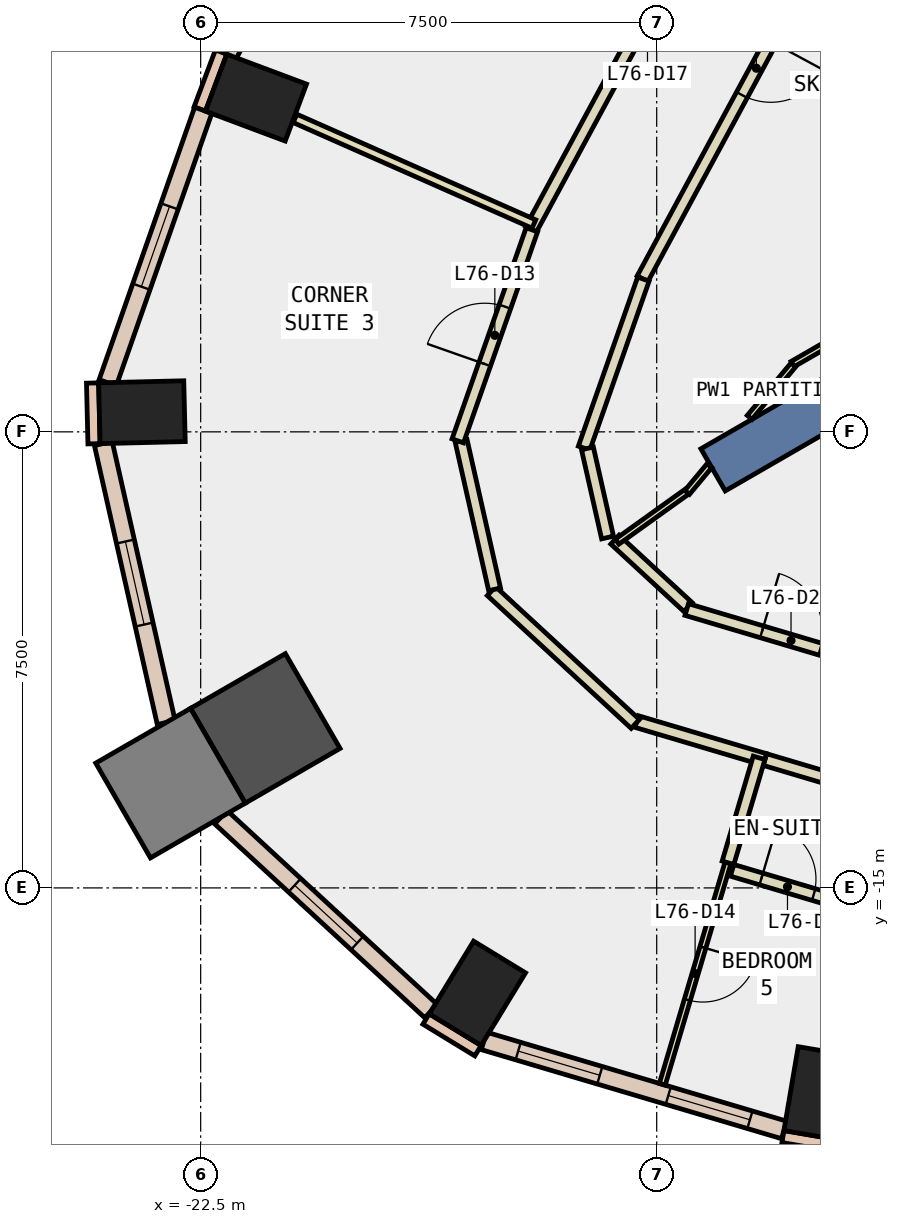
"""IFC4 building model, lengths in metres.
Left out: names, types, materials, properties, quantities, classifications, styles, units other than length and angle.
Written with IfcOpenShell. Run it as: python <this file> out.ifc"""

import sys

from ifc_helpers import new_model, si_unit, direction, frame, frame_2d, origin, origin_2d, place, context, subcontext, project, spatial, rectangle, extrude, element, fill, save


model = new_model("IFC4")
c1 = context("Model", 3, precision=1e-05, world=origin(), true_north=direction((0.0, 1.0)))
c2 = subcontext(c1, "Body", "Model", "MODEL_VIEW")
j1 = project(units=[si_unit("LENGTHUNIT", "METRE"), si_unit("PLANEANGLEUNIT", "RADIAN")], contexts=[c1])
p1 = place(None, origin())
s1 = spatial("IfcSite", under=j1, at=p1, CompositionType="ELEMENT")
p2 = place(p1, origin())
s2 = spatial("IfcBuilding", under=s1, at=p2, CompositionType="ELEMENT")
p3 = place(p2, frame((0.0, 0.0, 322.4)))
s3 = spatial("IfcBuildingStorey", under=s2, at=p3, CompositionType="ELEMENT", Elevation=322.4)
for number, where, z_axis, x_axis in (
    (1, (-12.297, -18.385, -0.34), (0.0, 0.0, 1.0), (-0.986, 0.168, 0.0)),
    (2, (-21.59, -2.004, -0.34), (0.0, 0.0, 1.0), (0.351, 0.936, 0.0)),
    (3, (-23.466, -7.177, -0.34), (0.0, 0.0, 1.0), (-0.024, 1.0, 0.0)),
):
    element("IfcColumn", number, at=place(p3, frame(where, z_axis=z_axis, x_axis=x_axis)), inside=s3, PredefinedType="COLUMN", context=c2, shape_type="SweptSolid", body=[
        extrude(rectangle(XDim=1.0, YDim=1.4, at=origin_2d()), origin(), (0.0, 0.0, 1.0), 3.34),
    ])
p4 = place(p3, frame((-21.437, -12.377, -0.34), z_axis=(0.0, 0.0, 1.0), x_axis=(0.866025403784, 0.5, 0.0)))
e4 = element("IfcColumn", 4, at=p4, inside=s3, PredefinedType="COLUMN", context=c2, shape_type="SweptSolid", body=[
    extrude(rectangle(XDim=1.8, YDim=1.8, at=origin_2d()), origin(), (0.0, 0.0, 1.0), 3.34),
])
p5 = place(p3, frame((-17.949, -16.734, -0.34), z_axis=(0.0, 0.0, 1.0), x_axis=(-0.853650808213, 0.520845752251, 0.0)))
e5 = element("IfcColumn", 5, at=p5, inside=s3, PredefinedType="COLUMN", context=c2, shape_type="SweptSolid", body=[
    extrude(rectangle(XDim=1.0, YDim=1.4, at=origin_2d()), origin(), (0.0, 0.0, 1.0), 3.34),
])
p6 = place(p3, frame((-22.996, -13.277, -0.34), z_axis=(0.0, 0.0, 1.0), x_axis=(0.866025403784, 0.5, 0.0)))
e6 = element("IfcColumn", 6, at=p6, inside=s3, PredefinedType="COLUMN", context=c2, shape_type="SweptSolid", body=[
    extrude(rectangle(XDim=1.8, YDim=1.8, at=origin_2d()), origin(), (0.0, 0.0, 1.0), 3.34),
])
p7 = place(p3, frame((-6.279, -3.625, -0.34), z_axis=(0.0, 0.0, 1.0), x_axis=(-0.866017533419, -0.500013631625, 0.0)))
e7 = element("IfcWall", 7, at=p7, inside=s3, PredefinedType="SHEAR", context=c2, shape_type="SweptSolid", body=[
    extrude(rectangle(XDim=9.0, YDim=0.8, at=frame_2d((4.5, 0.0))), origin(), (0.0, 0.0, 1.0), 3.34),
])
p8 = place(p3, frame((-22.164, -1.255, 0.0), z_axis=(0.0, 0.0, 1.0), x_axis=(-0.350962844851, -0.936389385637, 0.0)))
e8 = element("IfcWall", 8, at=p8, inside=s3, PredefinedType="STANDARD", context=c2, shape_type="SweptSolid", body=[
    extrude(rectangle(XDim=1.0, YDim=0.2, at=frame_2d((0.5, 0.0))), origin(), (0.0, 0.0, 1.0), 3.0),
])
p9 = place(p3, frame((-12.924, -19.089, 0.0), z_axis=(0.0, 0.0, 1.0), x_axis=(0.985800545746, -0.167920469293, 0.0)))
e9 = element("IfcWall", 9, at=p9, inside=s3, PredefinedType="STANDARD", context=c2, shape_type="SweptSolid", body=[
    extrude(rectangle(XDim=1.0, YDim=0.2, at=frame_2d((0.5, 0.0))), origin(), (0.0, 0.0, 1.0), 3.0),
])
p10 = place(p3, frame((-24.278, -6.697, 0.0), z_axis=(0.0, 0.0, 1.0), x_axis=(0.024186470916, -0.999707464524, 0.0)))
e10 = element("IfcWall", 10, at=p10, inside=s3, PredefinedType="STANDARD", context=c2, shape_type="SweptSolid", body=[
    extrude(rectangle(XDim=0.999, YDim=0.2, at=frame_2d((0.5, 0.0))), origin(), (0.0, 0.0, 1.0), 3.0),
])
p11 = place(p3, frame((-18.793, -17.156, 0.0), z_axis=(0.0, 0.0, 1.0), x_axis=(0.853679739553, -0.520798331677, 0.0)))
e11 = element("IfcWall", 11, at=p11, inside=s3, PredefinedType="STANDARD", context=c2, shape_type="SweptSolid", body=[
    extrude(rectangle(XDim=1.0, YDim=0.2, at=frame_2d((0.5, 0.0))), origin(), (0.0, 0.0, 1.0), 3.0),
])
p12 = place(p3, frame((-18.492, 5.285, 0.0), z_axis=(0.0, 0.0, 1.0), x_axis=(-0.475690331633, -0.879612817319, 0.0)))
e12 = element("IfcWall", 12, at=p12, inside=s3, PredefinedType="STANDARD", context=c2, shape_type="SweptSolid", body=[
    extrude(rectangle(XDim=7.484, YDim=0.3, at=frame_2d((3.742, 0.0))), origin(), (0.0, 0.0, 1.0), 3.0),
])
p13 = place(p12, frame((0.771, 0.0, 0.9)))
e13 = element("IfcOpeningElement", 13, at=p13, cuts=e12, PredefinedType="OPENING", context=c2, shape_type="SweptSolid", body=[
    extrude(rectangle(XDim=2.2, YDim=2.0, at=frame_2d((1.1, 1.0))), frame((0.0, 0.16, 0.0), z_axis=(0.0, -1.0, 0.0), x_axis=(1.0, 0.0, 0.0)), (0.0, 0.0, 1.0), 0.32),
])
p14 = place(p12, frame((4.513, 0.0, 0.9)))
e14 = element("IfcOpeningElement", 14, at=p14, cuts=e12, PredefinedType="OPENING", context=c2, shape_type="SweptSolid", body=[
    extrude(rectangle(XDim=2.2, YDim=2.0, at=frame_2d((1.1, 1.0))), frame((0.0, 0.16, 0.0), z_axis=(0.0, -1.0, 0.0), x_axis=(1.0, 0.0, 0.0)), (0.0, 0.0, 1.0), 0.32),
])
p15 = place(p3, frame((-22.458, -2.212, 0.0), z_axis=(0.0, 0.0, 1.0), x_axis=(-0.330923030855, -0.943657749213, 0.0)))
e15 = element("IfcWall", 15, at=p15, inside=s3, PredefinedType="STANDARD", context=c2, shape_type="SweptSolid", body=[
    extrude(rectangle(XDim=4.748, YDim=0.3, at=frame_2d((2.374, 0.0))), origin(), (0.0, 0.0, 1.0), 3.0),
])
p16 = place(p15, frame((1.674, 0.0, 0.9)))
e16 = element("IfcOpeningElement", 16, at=p16, cuts=e15, PredefinedType="OPENING", context=c2, shape_type="SweptSolid", body=[
    extrude(rectangle(XDim=1.4, YDim=2.0, at=frame_2d((0.7, 1.0))), frame((0.0, 0.16, 0.0), z_axis=(0.0, -1.0, 0.0), x_axis=(1.0, 0.0, 0.0)), (0.0, 0.0, 1.0), 0.32),
])
p17 = place(p3, frame((-24.101, -7.692, 0.0), z_axis=(0.0, 0.0, 1.0), x_axis=(0.219886442412, -0.975525475036, 0.0)))
e17 = element("IfcWall", 17, at=p17, inside=s3, PredefinedType="STANDARD", context=c2, shape_type="SweptSolid", body=[
    extrude(rectangle(XDim=4.703, YDim=0.3, at=frame_2d((2.352, 0.0))), origin(), (0.0, 0.0, 1.0), 3.0),
])
p18 = place(p17, frame((1.652, 0.0, 0.9)))
e18 = element("IfcOpeningElement", 18, at=p18, cuts=e17, PredefinedType="OPENING", context=c2, shape_type="SweptSolid", body=[
    extrude(rectangle(XDim=1.4, YDim=2.0, at=frame_2d((0.7, 1.0))), frame((0.0, 0.16, 0.0), z_axis=(0.0, -1.0, 0.0), x_axis=(1.0, 0.0, 0.0)), (0.0, 0.0, 1.0), 0.32),
])
p19 = place(p3, frame((-22.168, -13.837, 0.0), z_axis=(0.0, 0.0, 1.0), x_axis=(0.734934798699, -0.678137774838, 0.0)))
e19 = element("IfcWall", 19, at=p19, inside=s3, PredefinedType="STANDARD", context=c2, shape_type="SweptSolid", body=[
    extrude(rectangle(XDim=4.703, YDim=0.3, at=frame_2d((2.351, 0.0))), origin(), (0.0, 0.0, 1.0), 3.0),
])
p20 = place(p19, frame((1.651, 0.0, 0.9)))
e20 = element("IfcOpeningElement", 20, at=p20, cuts=e19, PredefinedType="OPENING", context=c2, shape_type="SweptSolid", body=[
    extrude(rectangle(XDim=1.4, YDim=2.0, at=frame_2d((0.7, 1.0))), frame((0.0, 0.16, 0.0), z_axis=(0.0, -1.0, 0.0), x_axis=(1.0, 0.0, 0.0)), (0.0, 0.0, 1.0), 0.32),
])
p21 = place(p3, frame((-17.842, -17.516, 0.0), z_axis=(0.0, 0.0, 1.0), x_axis=(0.958757933751, -0.284223898486, 0.0)))
e21 = element("IfcWall", 21, at=p21, inside=s3, PredefinedType="STANDARD", context=c2, shape_type="SweptSolid", body=[
    extrude(rectangle(XDim=5.15, YDim=0.3, at=frame_2d((2.575, 0.0))), origin(), (0.0, 0.0, 1.0), 3.0),
])
p22 = place(p21, frame((0.588, 0.0, 0.9)))
e22 = element("IfcOpeningElement", 22, at=p22, cuts=e21, PredefinedType="OPENING", context=c2, shape_type="SweptSolid", body=[
    extrude(rectangle(XDim=1.4, YDim=2.0, at=frame_2d((0.7, 1.0))), frame((0.0, 0.16, 0.0), z_axis=(0.0, -1.0, 0.0), x_axis=(1.0, 0.0, 0.0)), (0.0, 0.0, 1.0), 0.32),
])
p23 = place(p21, frame((3.163, 0.0, 0.9)))
e23 = element("IfcOpeningElement", 23, at=p23, cuts=e21, PredefinedType="OPENING", context=c2, shape_type="SweptSolid", body=[
    extrude(rectangle(XDim=1.4, YDim=2.0, at=frame_2d((0.7, 1.0))), frame((0.0, 0.16, 0.0), z_axis=(0.0, -1.0, 0.0), x_axis=(1.0, 0.0, 0.0)), (0.0, 0.0, 1.0), 0.32),
])
p24 = place(p3, frame((-11.489, 1.942, 0.0), z_axis=(0.0, 0.0, 1.0), x_axis=(-0.475643534049, -0.879638123615, 0.0)))
e24 = element("IfcWall", 24, at=p24, inside=s3, PredefinedType="PARTITIONING", context=c2, shape_type="SweptSolid", body=[
    extrude(rectangle(XDim=7.871, YDim=0.2, at=frame_2d((3.936, 0.0))), origin(), (0.0, 0.0, 1.0), 3.0),
])
p25 = place(p24, frame((3.436, 0.0, 0.0)))
e25 = element("IfcOpeningElement", 25, at=p25, cuts=e24, PredefinedType="OPENING", context=c2, shape_type="SweptSolid", body=[
    extrude(rectangle(XDim=1.0, YDim=2.1, at=frame_2d((0.5, 1.05))), frame((0.0, 0.11, 0.0), z_axis=(0.0, -1.0, 0.0), x_axis=(1.0, 0.0, 0.0)), (0.0, 0.0, 1.0), 0.22),
])
p26 = place(p3, frame((-15.219, -4.988, 0.0), z_axis=(0.0, 0.0, 1.0), x_axis=(-0.330981563235, -0.943637220969, 0.0)))
e26 = element("IfcWall", 26, at=p26, inside=s3, PredefinedType="PARTITIONING", context=c2, shape_type="SweptSolid", body=[
    extrude(rectangle(XDim=2.946, YDim=0.2, at=frame_2d((1.473, 0.0))), origin(), (0.0, 0.0, 1.0), 3.0),
])
p27 = place(p3, frame((-16.139, -7.772, 0.0), z_axis=(0.0, 0.0, 1.0), x_axis=(0.220111291919, -0.975474766034, 0.0)))
e27 = element("IfcWall", 27, at=p27, inside=s3, PredefinedType="PARTITIONING", context=c2, shape_type="SweptSolid", body=[
    extrude(rectangle(XDim=1.503, YDim=0.2, at=frame_2d((0.751, 0.0))), origin(), (0.0, 0.0, 1.0), 3.0),
])
p28 = place(p3, frame((-15.687, -9.272, 0.0), z_axis=(0.0, 0.0, 1.0), x_axis=(0.734946370973, -0.67812523312, 0.0)))
e28 = element("IfcWall", 28, at=p28, inside=s3, PredefinedType="PARTITIONING", context=c2, shape_type="SweptSolid", body=[
    extrude(rectangle(XDim=1.637, YDim=0.2, at=frame_2d((0.818, 0.0))), origin(), (0.0, 0.0, 1.0), 3.0),
])
p29 = place(p3, frame((-14.506, -10.422, 0.0), z_axis=(0.0, 0.0, 1.0), x_axis=(0.958760241353, -0.284216114252, 0.0)))
e29 = element("IfcWall", 29, at=p29, inside=s3, PredefinedType="PARTITIONING", context=c2, shape_type="SweptSolid", body=[
    extrude(rectangle(XDim=3.578, YDim=0.2, at=frame_2d((1.789, 0.0))), origin(), (0.0, 0.0, 1.0), 3.0),
])
p30 = place(p29, frame((1.289, 0.0, 0.0)))
e30 = element("IfcOpeningElement", 30, at=p30, cuts=e29, PredefinedType="OPENING", context=c2, shape_type="SweptSolid", body=[
    extrude(rectangle(XDim=1.0, YDim=2.1, at=frame_2d((0.5, 1.05))), frame((0.0, 0.11, 0.0), z_axis=(0.0, -1.0, 0.0), x_axis=(1.0, 0.0, 0.0)), (0.0, 0.0, 1.0), 0.22),
])
p31 = place(p3, frame((-17.068, -4.17, 0.0), z_axis=(0.0, 0.0, 1.0), x_axis=(0.475681790703, 0.879617436158, 0.0)))
e31 = element("IfcWall", 31, at=p31, inside=s3, PredefinedType="PARTITIONING", context=c2, shape_type="SweptSolid", body=[
    extrude(rectangle(XDim=8.058, YDim=0.2, at=frame_2d((4.029, 0.0))), origin(), (0.0, 0.0, 1.0), 3.0),
])
p32 = place(p31, frame((3.529, 0.0, 0.0)))
e32 = element("IfcOpeningElement", 32, at=p32, cuts=e31, PredefinedType="OPENING", context=c2, shape_type="SweptSolid", body=[
    extrude(rectangle(XDim=1.0, YDim=2.1, at=frame_2d((0.5, 1.05))), frame((0.0, 0.11, 0.0), z_axis=(0.0, -1.0, 0.0), x_axis=(1.0, 0.0, 0.0)), (0.0, 0.0, 1.0), 0.22),
])
p33 = place(p3, frame((-13.22, -12.889, 0.0), z_axis=(0.0, 0.0, 1.0), x_axis=(-0.958789155152, 0.284118559693, 0.0)))
e33 = element("IfcWall", 33, at=p33, inside=s3, PredefinedType="PARTITIONING", context=c2, shape_type="SweptSolid", body=[
    extrude(rectangle(XDim=2.2, YDim=0.2, at=frame_2d((1.1, 0.0))), origin(), (0.0, 0.0, 1.0), 3.0),
])
p34 = place(p3, frame((-15.352, -12.303, 0.0), z_axis=(0.0, 0.0, 1.0), x_axis=(-0.734786003021, 0.67829899732, 0.0)))
e34 = element("IfcWall", 34, at=p34, inside=s3, PredefinedType="PARTITIONING", context=c2, shape_type="SweptSolid", body=[
    extrude(rectangle(XDim=3.22, YDim=0.2, at=frame_2d((1.61, 0.0))), origin(), (0.0, 0.0, 1.0), 3.0),
])
p35 = place(p3, frame((-17.666, -10.09, 0.0), z_axis=(0.0, 0.0, 1.0), x_axis=(-0.219979161162, 0.975504571314, 0.0)))
e35 = element("IfcWall", 35, at=p35, inside=s3, PredefinedType="PARTITIONING", context=c2, shape_type="SweptSolid", body=[
    extrude(rectangle(XDim=2.5, YDim=0.2, at=frame_2d((1.25, 0.0))), origin(), (0.0, 0.0, 1.0), 3.0),
])
p36 = place(p3, frame((-18.271, -7.648, 0.0), z_axis=(0.0, 0.0, 1.0), x_axis=(0.33112192567, 0.943587977001, 0.0)))
e36 = element("IfcWall", 36, at=p36, inside=s3, PredefinedType="PARTITIONING", context=c2, shape_type="SweptSolid", body=[
    extrude(rectangle(XDim=3.678, YDim=0.2, at=frame_2d((1.839, 0.0))), origin(), (0.0, 0.0, 1.0), 3.0),
])
p37 = place(p36, frame((1.339, 0.0, 0.0)))
e37 = element("IfcOpeningElement", 37, at=p37, cuts=e36, PredefinedType="OPENING", context=c2, shape_type="SweptSolid", body=[
    extrude(rectangle(XDim=1.0, YDim=2.1, at=frame_2d((0.5, 1.05))), frame((0.0, 0.11, 0.0), z_axis=(0.0, -1.0, 0.0), x_axis=(1.0, 0.0, 0.0)), (0.0, 0.0, 1.0), 0.22),
])
p38 = place(p3, frame((-11.495, -13.401, 0.0), z_axis=(0.0, 0.0, 1.0), x_axis=(-0.958662482938, 0.284545679649, 0.0)))
e38 = element("IfcWall", 38, at=p38, inside=s3, PredefinedType="PARTITIONING", context=c2, shape_type="SweptSolid", body=[
    extrude(rectangle(XDim=1.799, YDim=0.2, at=frame_2d((0.9, 0.0))), origin(), (0.0, 0.0, 1.0), 3.0),
])
p39 = place(p3, frame((-6.705, -2.887, 0.0), z_axis=(0.0, 0.0, 1.0), x_axis=(-0.866001397039, -0.500041578597, 0.0)))
e39 = element("IfcWall", 39, at=p39, inside=s3, PredefinedType="PARTITIONING", context=c2, shape_type="SweptSolid", body=[
    extrude(rectangle(XDim=6.998, YDim=0.1, at=frame_2d((3.499, 0.0))), origin(), (0.0, 0.0, 1.0), 3.0),
])
p40 = place(p3, frame((-12.753, -6.399, 0.0), z_axis=(0.0, 0.0, 1.0), x_axis=(-0.640077503072, -0.768310347491, 0.0)))
e40 = element("IfcWall", 40, at=p40, inside=s3, PredefinedType="PARTITIONING", context=c2, shape_type="SweptSolid", body=[
    extrude(rectangle(XDim=1.123, YDim=0.1, at=frame_2d((0.562, 0.0))), origin(), (0.0, 0.0, 1.0), 3.0),
])
p41 = place(p3, frame((-14.507, -8.486, 0.0), z_axis=(0.0, 0.0, 1.0), x_axis=(-0.812782900134, -0.582566697684, 0.0)))
e41 = element("IfcWall", 41, at=p41, inside=s3, PredefinedType="PARTITIONING", context=c2, shape_type="SweptSolid", body=[
    extrude(rectangle(XDim=1.407, YDim=0.1, at=frame_2d((0.704, 0.0))), origin(), (0.0, 0.0, 1.0), 3.0),
])
p42 = place(p3, frame((-17.02, -4.082, 0.0), z_axis=(0.0, 0.0, 1.0), x_axis=(-0.914599611743, 0.404360668462, 0.0)))
e42 = element("IfcWall", 42, at=p42, inside=s3, PredefinedType="PARTITIONING", context=c2, shape_type="SweptSolid", body=[
    extrude(rectangle(XDim=4.296, YDim=0.15, at=frame_2d((2.148, 0.0))), origin(), (0.0, 0.0, 1.0), 3.0),
])
p43 = place(p3, frame((-13.828, -14.587, 0.0), z_axis=(0.0, 0.0, 1.0), x_axis=(-0.284245833657, -0.958751430794, 0.0)))
e43 = element("IfcWall", 43, at=p43, inside=s3, PredefinedType="PARTITIONING", context=c2, shape_type="SweptSolid", body=[
    extrude(rectangle(XDim=3.8, YDim=0.1, at=frame_2d((1.9, 0.0))), origin(), (0.0, 0.0, 1.0), 3.0),
])
p44 = place(p43, frame((1.45, 0.0, 0.0)))
e44 = element("IfcOpeningElement", 44, at=p44, cuts=e43, PredefinedType="OPENING", context=c2, shape_type="SweptSolid", body=[
    extrude(rectangle(XDim=0.9, YDim=2.1, at=frame_2d((0.45, 1.05))), frame((0.0, 0.06, 0.0), z_axis=(0.0, -1.0, 0.0), x_axis=(1.0, 0.0, 0.0)), (0.0, 0.0, 1.0), 0.12),
])
p45 = place(p3, frame((-13.316, -12.861, 0.0), z_axis=(0.0, 0.0, 1.0), x_axis=(-0.283898972531, -0.958854198195, 0.0)))
e45 = element("IfcWall", 45, at=p45, inside=s3, PredefinedType="PARTITIONING", context=c2, shape_type="SweptSolid", body=[
    extrude(rectangle(XDim=1.8, YDim=0.2, at=frame_2d((0.9, 0.0))), origin(), (0.0, 0.0, 1.0), 3.0),
])
p46 = place(p3, frame((-13.76, -14.711, 0.0), z_axis=(0.0, 0.0, 1.0), x_axis=(0.958772187895, -0.284175811285, 0.0)))
e46 = element("IfcWall", 46, at=p46, inside=s3, PredefinedType="PARTITIONING", context=c2, shape_type="SweptSolid", body=[
    extrude(rectangle(XDim=1.9, YDim=0.2, at=frame_2d((0.95, 0.0))), origin(), (0.0, 0.0, 1.0), 3.0),
])
p47 = place(p46, frame((0.5, 0.0, 0.0)))
e47 = element("IfcOpeningElement", 47, at=p47, cuts=e46, PredefinedType="OPENING", context=c2, shape_type="SweptSolid", body=[
    extrude(rectangle(XDim=0.9, YDim=2.1, at=frame_2d((0.45, 1.05))), frame((0.0, 0.11, 0.0), z_axis=(0.0, -1.0, 0.0), x_axis=(1.0, 0.0, 0.0)), (0.0, 0.0, 1.0), 0.22),
])
p48 = place(p3, frame((-14.133, -8.056, 0.0), z_axis=(0.0, 0.0, 1.0), x_axis=(-0.640142394154, -0.768256282244, 0.0)))
e48 = element("IfcWall", 48, at=p48, inside=s3, PredefinedType="PARTITIONING", context=c2, shape_type="SweptSolid", body=[
    extrude(rectangle(XDim=0.572, YDim=0.1, at=frame_2d((0.286, 0.0))), origin(), (0.0, 0.0, 1.0), 3.0),
])
p49 = place(p16, origin())
e49 = element("IfcWindow", 49, at=p49, inside=s3, PartitioningType="SINGLE_PANEL", PredefinedType="WINDOW", context=c2, shape_type="SweptSolid", body=[
    extrude(rectangle(XDim=1.4, YDim=2.0, at=frame_2d((0.7, 1.0))), frame((0.0, 0.03, 0.0), z_axis=(0.0, -1.0, 0.0), x_axis=(1.0, 0.0, 0.0)), (0.0, 0.0, 1.0), 0.06),
])
fill(e16, e49)
p50 = place(p18, origin())
e50 = element("IfcWindow", 50, at=p50, inside=s3, PartitioningType="SINGLE_PANEL", PredefinedType="WINDOW", context=c2, shape_type="SweptSolid", body=[
    extrude(rectangle(XDim=1.4, YDim=2.0, at=frame_2d((0.7, 1.0))), frame((0.0, 0.03, 0.0), z_axis=(0.0, -1.0, 0.0), x_axis=(1.0, 0.0, 0.0)), (0.0, 0.0, 1.0), 0.06),
])
fill(e18, e50)
p51 = place(p20, origin())
e51 = element("IfcWindow", 51, at=p51, inside=s3, PartitioningType="SINGLE_PANEL", PredefinedType="WINDOW", context=c2, shape_type="SweptSolid", body=[
    extrude(rectangle(XDim=1.4, YDim=2.0, at=frame_2d((0.7, 1.0))), frame((0.0, 0.03, 0.0), z_axis=(0.0, -1.0, 0.0), x_axis=(1.0, 0.0, 0.0)), (0.0, 0.0, 1.0), 0.06),
])
fill(e20, e51)
p52 = place(p22, origin())
e52 = element("IfcWindow", 52, at=p52, inside=s3, PartitioningType="SINGLE_PANEL", PredefinedType="WINDOW", context=c2, shape_type="SweptSolid", body=[
    extrude(rectangle(XDim=1.4, YDim=2.0, at=frame_2d((0.7, 1.0))), frame((0.0, 0.03, 0.0), z_axis=(0.0, -1.0, 0.0), x_axis=(1.0, 0.0, 0.0)), (0.0, 0.0, 1.0), 0.06),
])
fill(e22, e52)
p53 = place(p23, origin())
e53 = element("IfcWindow", 53, at=p53, inside=s3, PartitioningType="SINGLE_PANEL", PredefinedType="WINDOW", context=c2, shape_type="SweptSolid", body=[
    extrude(rectangle(XDim=1.4, YDim=2.0, at=frame_2d((0.7, 1.0))), frame((0.0, 0.03, 0.0), z_axis=(0.0, -1.0, 0.0), x_axis=(1.0, 0.0, 0.0)), (0.0, 0.0, 1.0), 0.06),
])
fill(e23, e53)
p54 = place(p37, origin())
e54 = element("IfcDoor", 54, at=p54, inside=s3, OperationType="SINGLE_SWING_LEFT", PredefinedType="DOOR", context=c2, shape_type="SweptSolid", body=[
    extrude(rectangle(XDim=1.0, YDim=2.1, at=frame_2d((0.5, 1.05))), frame((0.0, 0.025, 0.0), z_axis=(0.0, -1.0, 0.0), x_axis=(1.0, 0.0, 0.0)), (0.0, 0.0, 1.0), 0.05),
])
fill(e37, e54)
p55 = place(p44, origin())
e55 = element("IfcDoor", 55, at=p55, inside=s3, OperationType="SINGLE_SWING_RIGHT", PredefinedType="DOOR", context=c2, shape_type="SweptSolid", body=[
    extrude(rectangle(XDim=0.9, YDim=2.1, at=frame_2d((0.45, 1.05))), frame((0.0, 0.025, 0.0), z_axis=(0.0, -1.0, 0.0), x_axis=(1.0, 0.0, 0.0)), (0.0, 0.0, 1.0), 0.05),
])
fill(e44, e55)
p56 = place(p47, origin())
e56 = element("IfcDoor", 56, at=p56, inside=s3, OperationType="SINGLE_SWING_LEFT", PredefinedType="DOOR", context=c2, shape_type="SweptSolid", body=[
    extrude(rectangle(XDim=0.9, YDim=2.1, at=frame_2d((0.45, 1.05))), frame((0.0, 0.025, 0.0), z_axis=(0.0, -1.0, 0.0), x_axis=(1.0, 0.0, 0.0)), (0.0, 0.0, 1.0), 0.05),
])
fill(e47, e56)
p57 = place(p25, origin())
e57 = element("IfcDoor", 57, at=p57, inside=s3, OperationType="SINGLE_SWING_LEFT", PredefinedType="DOOR", context=c2, shape_type="SweptSolid", body=[
    extrude(rectangle(XDim=1.0, YDim=2.1, at=frame_2d((0.5, 1.05))), frame((0.0, 0.025, 0.0), z_axis=(0.0, -1.0, 0.0), x_axis=(1.0, 0.0, 0.0)), (0.0, 0.0, 1.0), 0.05),
])
fill(e25, e57)
p58 = place(p30, origin())
e58 = element("IfcDoor", 58, at=p58, inside=s3, OperationType="SINGLE_SWING_RIGHT", PredefinedType="DOOR", context=c2, shape_type="SweptSolid", body=[
    extrude(rectangle(XDim=1.0, YDim=2.1, at=frame_2d((0.5, 1.05))), frame((0.0, 0.025, 0.0), z_axis=(0.0, -1.0, 0.0), x_axis=(1.0, 0.0, 0.0)), (0.0, 0.0, 1.0), 0.05),
])
fill(e30, e58)
save(model, sys.argv[1])
